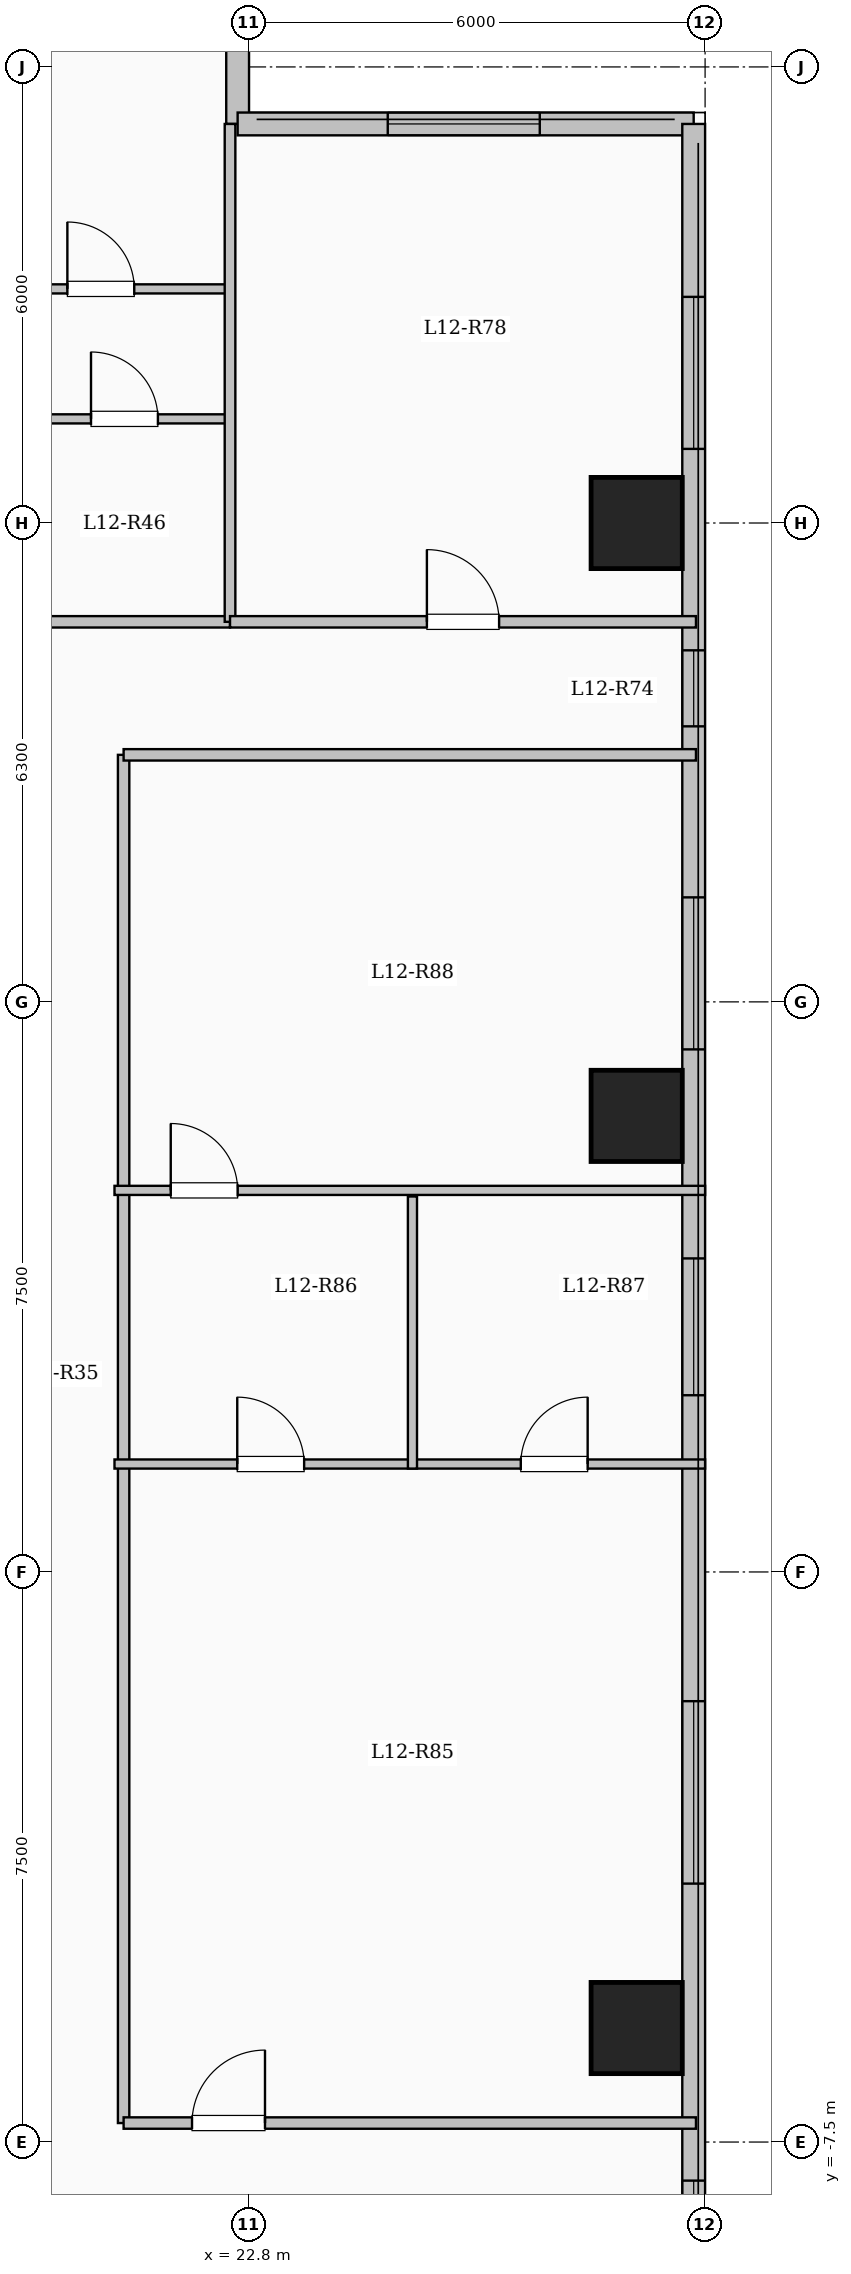
"""IFC4 building model, lengths in metres.
Left out: names, types, materials, properties, quantities, classifications, styles, units other than length and angle.
Written with IfcOpenShell. Run it as: python <this file> out.ifc"""

import sys

from ifc_helpers import new_model, si_unit, direction, frame, frame_2d, origin, origin_2d, place, context, subcontext, project, spatial, rectangle, extrude, element, fill, save


model = new_model("IFC4")
c1 = context("Model", 3, precision=1e-05, world=origin(), true_north=direction((0.0, 1.0)))
c2 = subcontext(c1, "Body", "Model", "MODEL_VIEW")
j1 = project(units=[si_unit("LENGTHUNIT", "METRE"), si_unit("PLANEANGLEUNIT", "RADIAN")], contexts=[c1])
p1 = place(None, origin())
s1 = spatial("IfcSite", under=j1, at=p1, CompositionType="ELEMENT")
p2 = place(p1, origin())
s2 = spatial("IfcBuilding", under=s1, at=p2, CompositionType="ELEMENT")
p3 = place(p2, frame((0.0, 0.0, 47.45)))
s3 = spatial("IfcBuildingStorey", under=s2, at=p3, CompositionType="ELEMENT", Elevation=47.45)
for number, where, z_axis, x_axis in (
    (1, (27.9, -6.0, 0.0), (0.0, 0.0, 1.0), (1.0, 0.0, 0.0)),
    (2, (27.9, 6.0, 0.0), (0.0, 0.0, 1.0), (1.0, 0.0, 0.0)),
    (3, (27.9, 13.8, 0.0), (0.0, 0.0, 1.0), (1.0, 0.0, 0.0)),
):
    element("IfcColumn", number, at=place(p3, frame(where, z_axis=z_axis, x_axis=x_axis)), inside=s3, PredefinedType="COLUMN", context=c2, shape_type="SweptSolid", body=[
        extrude(rectangle(XDim=1.2, YDim=1.2, at=origin_2d()), origin(), (0.0, 0.0, 1.0), 3.35),
    ])
p4 = place(p3, frame((22.65, 23.55, 0.0), z_axis=(0.0, 0.0, 1.0), x_axis=(0.0, -1.0, 0.0)))
e4 = element("IfcWall", 4, at=p4, inside=s3, PredefinedType="SOLIDWALL", context=c2, shape_type="SweptSolid", body=[
    extrude(rectangle(XDim=4.5, YDim=0.3, at=frame_2d((2.25, 0.0))), origin(), (0.0, 0.0, 1.0), 3.1),
])
p5 = place(p4, frame((1.367, 0.0, 0.9)))
e5 = element("IfcOpeningElement", 5, at=p5, cuts=e4, PredefinedType="OPENING", context=c2, shape_type="SweptSolid", body=[
    extrude(rectangle(XDim=1.8, YDim=1.65, at=frame_2d((0.9, 0.825))), frame((0.0, 0.16, 0.0), z_axis=(0.0, -1.0, 0.0), x_axis=(1.0, 0.0, 0.0)), (0.0, 0.0, 1.0), 0.32),
])
p6 = place(p3, frame((22.65, 19.05, 0.0), z_axis=(0.0, 0.0, 1.0), x_axis=(1.0, 0.0, 0.0)))
e6 = element("IfcWall", 6, at=p6, inside=s3, PredefinedType="SOLIDWALL", context=c2, shape_type="SweptSolid", body=[
    extrude(rectangle(XDim=6.0, YDim=0.3, at=frame_2d((3.0, 0.0))), origin(), (0.0, 0.0, 1.0), 3.1),
])
p7 = place(p6, frame((1.975, 0.0, 0.9)))
e7 = element("IfcOpeningElement", 7, at=p7, cuts=e6, PredefinedType="OPENING", context=c2, shape_type="SweptSolid", body=[
    extrude(rectangle(XDim=2.0, YDim=1.7, at=frame_2d((1.0, 0.85))), frame((0.0, 0.16, 0.0), z_axis=(0.0, -1.0, 0.0), x_axis=(1.0, 0.0, 0.0)), (0.0, 0.0, 1.0), 0.32),
])
p8 = place(p3, frame((28.65, 19.05, 0.0), z_axis=(0.0, 0.0, 1.0), x_axis=(0.0, -1.0, 0.0)))
e8 = element("IfcWall", 8, at=p8, inside=s3, PredefinedType="SOLIDWALL", context=c2, shape_type="SweptSolid", body=[
    extrude(rectangle(XDim=38.1, YDim=0.3, at=frame_2d((19.05, 0.0))), origin(), (0.0, 0.0, 1.0), 3.1),
])
p9 = place(p8, frame((2.275, 0.0, 0.9)))
e9 = element("IfcOpeningElement", 9, at=p9, cuts=e8, PredefinedType="OPENING", context=c2, shape_type="SweptSolid", body=[
    extrude(rectangle(XDim=2.0, YDim=1.7, at=frame_2d((1.0, 0.85))), frame((0.0, 0.16, 0.0), z_axis=(0.0, -1.0, 0.0), x_axis=(1.0, 0.0, 0.0)), (0.0, 0.0, 1.0), 0.32),
])
p10 = place(p8, frame((6.925, 0.0, 0.95)))
e10 = element("IfcOpeningElement", 10, at=p10, cuts=e8, PredefinedType="OPENING", context=c2, shape_type="SweptSolid", body=[
    extrude(rectangle(XDim=1.0, YDim=1.5, at=frame_2d((0.5, 0.75))), frame((0.0, 0.16, 0.0), z_axis=(0.0, -1.0, 0.0), x_axis=(1.0, 0.0, 0.0)), (0.0, 0.0, 1.0), 0.32),
])
p11 = place(p8, frame((10.175, 0.0, 0.9)))
e11 = element("IfcOpeningElement", 11, at=p11, cuts=e8, PredefinedType="OPENING", context=c2, shape_type="SweptSolid", body=[
    extrude(rectangle(XDim=2.0, YDim=1.7, at=frame_2d((1.0, 0.85))), frame((0.0, 0.16, 0.0), z_axis=(0.0, -1.0, 0.0), x_axis=(1.0, 0.0, 0.0)), (0.0, 0.0, 1.0), 0.32),
])
p12 = place(p8, frame((14.925, 0.0, 0.9)))
e12 = element("IfcOpeningElement", 12, at=p12, cuts=e8, PredefinedType="OPENING", context=c2, shape_type="SweptSolid", body=[
    extrude(rectangle(XDim=1.8, YDim=1.65, at=frame_2d((0.9, 0.825))), frame((0.0, 0.16, 0.0), z_axis=(0.0, -1.0, 0.0), x_axis=(1.0, 0.0, 0.0)), (0.0, 0.0, 1.0), 0.32),
])
p13 = place(p8, frame((20.75, 0.0, 0.9)))
e13 = element("IfcOpeningElement", 13, at=p13, cuts=e8, PredefinedType="OPENING", context=c2, shape_type="SweptSolid", body=[
    extrude(rectangle(XDim=2.4, YDim=1.8, at=frame_2d((1.2, 0.9))), frame((0.0, 0.16, 0.0), z_axis=(0.0, -1.0, 0.0), x_axis=(1.0, 0.0, 0.0)), (0.0, 0.0, 1.0), 0.32),
])
p14 = place(p8, frame((27.058, 0.0, 0.9)))
e14 = element("IfcOpeningElement", 14, at=p14, cuts=e8, PredefinedType="OPENING", context=c2, shape_type="SweptSolid", body=[
    extrude(rectangle(XDim=1.5, YDim=1.65, at=frame_2d((0.75, 0.825))), frame((0.0, 0.16, 0.0), z_axis=(0.0, -1.0, 0.0), x_axis=(1.0, 0.0, 0.0)), (0.0, 0.0, 1.0), 0.32),
])
p15 = place(p8, frame((32.55, 0.0, 0.9)))
e15 = element("IfcOpeningElement", 15, at=p15, cuts=e8, PredefinedType="OPENING", context=c2, shape_type="SweptSolid", body=[
    extrude(rectangle(XDim=2.4, YDim=1.8, at=frame_2d((1.2, 0.9))), frame((0.0, 0.16, 0.0), z_axis=(0.0, -1.0, 0.0), x_axis=(1.0, 0.0, 0.0)), (0.0, 0.0, 1.0), 0.32),
])
p16 = place(p3, frame((3.85, 12.5, 0.0), z_axis=(0.0, 0.0, 1.0), x_axis=(1.0, 0.0, 0.0)))
e16 = element("IfcWall", 16, at=p16, inside=s3, PredefinedType="PARTITIONING", context=c2, shape_type="SweptSolid", body=[
    extrude(rectangle(XDim=18.7, YDim=0.15, at=frame_2d((9.35, 0.0))), origin(), (0.0, 0.0, 1.0), 3.1),
])
p17 = place(p16, frame((1.6, 0.0, 0.0)))
e17 = element("IfcOpeningElement", 17, at=p17, cuts=e16, PredefinedType="OPENING", context=c2, shape_type="SweptSolid", body=[
    extrude(rectangle(XDim=0.96, YDim=2.15, at=frame_2d((0.48, 1.075))), frame((0.0, 0.085, 0.0), z_axis=(0.0, -1.0, 0.0), x_axis=(1.0, 0.0, 0.0)), (0.0, 0.0, 1.0), 0.17),
])
p18 = place(p16, frame((6.64, 0.0, 0.0)))
e18 = element("IfcOpeningElement", 18, at=p18, cuts=e16, PredefinedType="OPENING", context=c2, shape_type="SweptSolid", body=[
    extrude(rectangle(XDim=0.96, YDim=2.15, at=frame_2d((0.48, 1.075))), frame((0.0, 0.085, 0.0), z_axis=(0.0, -1.0, 0.0), x_axis=(1.0, 0.0, 0.0)), (0.0, 0.0, 1.0), 0.17),
])
p19 = place(p3, frame((21.15, -7.25, 0.0), z_axis=(0.0, 0.0, 1.0), x_axis=(0.0, 1.0, 0.0)))
e19 = element("IfcWall", 19, at=p19, inside=s3, PredefinedType="PARTITIONING", context=c2, shape_type="SweptSolid", body=[
    extrude(rectangle(XDim=18.0, YDim=0.15, at=frame_2d((9.0, 0.0))), origin(), (0.0, 0.0, 1.0), 2.585),
])
p20 = place(p3, frame((19.772, 15.17, 0.0), z_axis=(0.0, 0.0, 1.0), x_axis=(1.0, 0.0, 0.0)))
e20 = element("IfcWall", 20, at=p20, inside=s3, PredefinedType="PARTITIONING", context=c2, shape_type="SweptSolid", body=[
    extrude(rectangle(XDim=2.778, YDim=0.12, at=frame_2d((1.389, 0.0))), origin(), (0.0, 0.0, 1.0), 3.1),
])
p21 = place(p20, frame((0.949, 0.0, 0.0)))
e21 = element("IfcOpeningElement", 21, at=p21, cuts=e20, PredefinedType="OPENING", context=c2, shape_type="SweptSolid", body=[
    extrude(rectangle(XDim=0.88, YDim=2.1, at=frame_2d((0.44, 1.05))), frame((0.0, 0.07, 0.0), z_axis=(0.0, -1.0, 0.0), x_axis=(1.0, 0.0, 0.0)), (0.0, 0.0, 1.0), 0.14),
])
p22 = place(p3, frame((16.11, 16.88, 0.0), z_axis=(0.0, 0.0, 1.0), x_axis=(1.0, 0.0, 0.0)))
e22 = element("IfcWall", 22, at=p22, inside=s3, PredefinedType="PARTITIONING", context=c2, shape_type="SweptSolid", body=[
    extrude(rectangle(XDim=6.5, YDim=0.12, at=frame_2d((3.25, 0.0))), origin(), (0.0, 0.0, 1.0), 3.1),
])
p23 = place(p22, frame((1.14, 0.0, 0.0)))
e23 = element("IfcOpeningElement", 23, at=p23, cuts=e22, PredefinedType="OPENING", context=c2, shape_type="SweptSolid", body=[
    extrude(rectangle(XDim=0.88, YDim=2.1, at=frame_2d((0.44, 1.05))), frame((0.0, 0.07, 0.0), z_axis=(0.0, -1.0, 0.0), x_axis=(1.0, 0.0, 0.0)), (0.0, 0.0, 1.0), 0.14),
])
p24 = place(p22, frame((4.3, 0.0, 0.0)))
e24 = element("IfcOpeningElement", 24, at=p24, cuts=e22, PredefinedType="OPENING", context=c2, shape_type="SweptSolid", body=[
    extrude(rectangle(XDim=0.88, YDim=2.1, at=frame_2d((0.44, 1.05))), frame((0.0, 0.07, 0.0), z_axis=(0.0, -1.0, 0.0), x_axis=(1.0, 0.0, 0.0)), (0.0, 0.0, 1.0), 0.14),
])
p25 = place(p3, frame((21.15, -7.25, 0.0), z_axis=(0.0, 0.0, 1.0), x_axis=(1.0, 0.0, 0.0)))
e25 = element("IfcWall", 25, at=p25, inside=s3, PredefinedType="PARTITIONING", context=c2, shape_type="SweptSolid", body=[
    extrude(rectangle(XDim=7.53, YDim=0.15, at=frame_2d((3.765, 0.0))), origin(), (0.0, 0.0, 1.0), 3.1),
])
p26 = place(p25, frame((0.9, 0.0, 0.0)))
e26 = element("IfcOpeningElement", 26, at=p26, cuts=e25, PredefinedType="OPENING", context=c2, shape_type="SweptSolid", body=[
    extrude(rectangle(XDim=0.96, YDim=2.15, at=frame_2d((0.48, 1.075))), frame((0.0, 0.085, 0.0), z_axis=(0.0, -1.0, 0.0), x_axis=(1.0, 0.0, 0.0)), (0.0, 0.0, 1.0), 0.17),
])
p27 = place(p3, frame((21.15, 10.75, 0.0), z_axis=(0.0, 0.0, 1.0), x_axis=(1.0, 0.0, 0.0)))
e27 = element("IfcWall", 27, at=p27, inside=s3, PredefinedType="PARTITIONING", context=c2, shape_type="SweptSolid", body=[
    extrude(rectangle(XDim=7.53, YDim=0.15, at=frame_2d((3.765, 0.0))), origin(), (0.0, 0.0, 1.0), 3.1),
])
p28 = place(p3, frame((22.55, 12.5, 0.0), z_axis=(0.0, 0.0, 1.0), x_axis=(0.0, 1.0, 0.0)))
e28 = element("IfcWall", 28, at=p28, inside=s3, PredefinedType="PARTITIONING", context=c2, shape_type="SweptSolid", body=[
    extrude(rectangle(XDim=6.55, YDim=0.14, at=frame_2d((3.275, 0.0))), origin(), (0.0, 0.0, 1.0), 3.1),
])
p29 = place(p3, frame((22.55, 12.5, 0.0), z_axis=(0.0, 0.0, 1.0), x_axis=(1.0, 0.0, 0.0)))
e29 = element("IfcWall", 29, at=p29, inside=s3, PredefinedType="PARTITIONING", context=c2, shape_type="SweptSolid", body=[
    extrude(rectangle(XDim=6.13, YDim=0.15, at=frame_2d((3.065, 0.0))), origin(), (0.0, 0.0, 1.0), 3.1),
])
p30 = place(p29, frame((2.59, 0.0, 0.0)))
e30 = element("IfcOpeningElement", 30, at=p30, cuts=e29, PredefinedType="OPENING", context=c2, shape_type="SweptSolid", body=[
    extrude(rectangle(XDim=0.95, YDim=2.15, at=frame_2d((0.475, 1.075))), frame((0.0, 0.085, 0.0), z_axis=(0.0, -1.0, 0.0), x_axis=(1.0, 0.0, 0.0)), (0.0, 0.0, 1.0), 0.17),
])
p31 = place(p3, frame((21.03, 1.42, 0.0), z_axis=(0.0, 0.0, 1.0), x_axis=(1.0, 0.0, 0.0)))
e31 = element("IfcWall", 31, at=p31, inside=s3, PredefinedType="PARTITIONING", context=c2, shape_type="SweptSolid", body=[
    extrude(rectangle(XDim=7.77, YDim=0.12, at=frame_2d((3.885, 0.0))), origin(), (0.0, 0.0, 1.0), 3.1),
])
p32 = place(p31, frame((1.615, 0.0, 0.0)))
e32 = element("IfcOpeningElement", 32, at=p32, cuts=e31, PredefinedType="OPENING", context=c2, shape_type="SweptSolid", body=[
    extrude(rectangle(XDim=0.88, YDim=2.1, at=frame_2d((0.44, 1.05))), frame((0.0, 0.07, 0.0), z_axis=(0.0, -1.0, 0.0), x_axis=(1.0, 0.0, 0.0)), (0.0, 0.0, 1.0), 0.14),
])
p33 = place(p31, frame((5.345, 0.0, 0.0)))
e33 = element("IfcOpeningElement", 33, at=p33, cuts=e31, PredefinedType="OPENING", context=c2, shape_type="SweptSolid", body=[
    extrude(rectangle(XDim=0.88, YDim=2.1, at=frame_2d((0.44, 1.05))), frame((0.0, 0.07, 0.0), z_axis=(0.0, -1.0, 0.0), x_axis=(1.0, 0.0, 0.0)), (0.0, 0.0, 1.0), 0.14),
])
p34 = place(p3, frame((21.03, 5.02, 0.0), z_axis=(0.0, 0.0, 1.0), x_axis=(1.0, 0.0, 0.0)))
e34 = element("IfcWall", 34, at=p34, inside=s3, PredefinedType="PARTITIONING", context=c2, shape_type="SweptSolid", body=[
    extrude(rectangle(XDim=7.77, YDim=0.12, at=frame_2d((3.885, 0.0))), origin(), (0.0, 0.0, 1.0), 3.1),
])
p35 = place(p34, frame((0.74, 0.0, 0.0)))
e35 = element("IfcOpeningElement", 35, at=p35, cuts=e34, PredefinedType="OPENING", context=c2, shape_type="SweptSolid", body=[
    extrude(rectangle(XDim=0.88, YDim=2.1, at=frame_2d((0.44, 1.05))), frame((0.0, 0.07, 0.0), z_axis=(0.0, -1.0, 0.0), x_axis=(1.0, 0.0, 0.0)), (0.0, 0.0, 1.0), 0.14),
])
p36 = place(p3, frame((24.95, 1.36, 0.0), z_axis=(0.0, 0.0, 1.0), x_axis=(0.0, 1.0, 0.0)))
e36 = element("IfcWall", 36, at=p36, inside=s3, PredefinedType="PARTITIONING", context=c2, shape_type="SweptSolid", body=[
    extrude(rectangle(XDim=3.58, YDim=0.12, at=frame_2d((1.79, 0.0))), origin(), (0.0, 0.0, 1.0), 3.1),
])
p37 = place(p7, origin())
e37 = element("IfcWindow", 37, at=p37, inside=s3, PartitioningType="SINGLE_PANEL", PredefinedType="WINDOW", context=c2, shape_type="SweptSolid", body=[
    extrude(rectangle(XDim=2.0, YDim=1.7, at=frame_2d((1.0, 0.85))), frame((0.0, 0.03, 0.0), z_axis=(0.0, -1.0, 0.0), x_axis=(1.0, 0.0, 0.0)), (0.0, 0.0, 1.0), 0.06),
])
fill(e7, e37)
p38 = place(p9, origin())
e38 = element("IfcWindow", 38, at=p38, inside=s3, PartitioningType="SINGLE_PANEL", PredefinedType="WINDOW", context=c2, shape_type="SweptSolid", body=[
    extrude(rectangle(XDim=2.0, YDim=1.7, at=frame_2d((1.0, 0.85))), frame((0.0, 0.03, 0.0), z_axis=(0.0, -1.0, 0.0), x_axis=(1.0, 0.0, 0.0)), (0.0, 0.0, 1.0), 0.06),
])
fill(e9, e38)
p39 = place(p10, origin())
e39 = element("IfcWindow", 39, at=p39, inside=s3, PartitioningType="SINGLE_PANEL", PredefinedType="WINDOW", context=c2, shape_type="SweptSolid", body=[
    extrude(rectangle(XDim=1.0, YDim=1.5, at=frame_2d((0.5, 0.75))), frame((0.0, 0.03, 0.0), z_axis=(0.0, -1.0, 0.0), x_axis=(1.0, 0.0, 0.0)), (0.0, 0.0, 1.0), 0.06),
])
fill(e10, e39)
p40 = place(p11, origin())
e40 = element("IfcWindow", 40, at=p40, inside=s3, PartitioningType="SINGLE_PANEL", PredefinedType="WINDOW", context=c2, shape_type="SweptSolid", body=[
    extrude(rectangle(XDim=2.0, YDim=1.7, at=frame_2d((1.0, 0.85))), frame((0.0, 0.03, 0.0), z_axis=(0.0, -1.0, 0.0), x_axis=(1.0, 0.0, 0.0)), (0.0, 0.0, 1.0), 0.06),
])
fill(e11, e40)
p41 = place(p12, origin())
e41 = element("IfcWindow", 41, at=p41, inside=s3, PartitioningType="SINGLE_PANEL", PredefinedType="WINDOW", context=c2, shape_type="SweptSolid", body=[
    extrude(rectangle(XDim=1.8, YDim=1.65, at=frame_2d((0.9, 0.825))), frame((0.0, 0.03, 0.0), z_axis=(0.0, -1.0, 0.0), x_axis=(1.0, 0.0, 0.0)), (0.0, 0.0, 1.0), 0.06),
])
fill(e12, e41)
p42 = place(p13, origin())
e42 = element("IfcWindow", 42, at=p42, inside=s3, PartitioningType="SINGLE_PANEL", PredefinedType="WINDOW", context=c2, shape_type="SweptSolid", body=[
    extrude(rectangle(XDim=2.4, YDim=1.8, at=frame_2d((1.2, 0.9))), frame((0.0, 0.03, 0.0), z_axis=(0.0, -1.0, 0.0), x_axis=(1.0, 0.0, 0.0)), (0.0, 0.0, 1.0), 0.06),
])
fill(e13, e42)
p43 = place(p14, origin())
e43 = element("IfcWindow", 43, at=p43, inside=s3, PartitioningType="SINGLE_PANEL", PredefinedType="WINDOW", context=c2, shape_type="SweptSolid", body=[
    extrude(rectangle(XDim=1.5, YDim=1.65, at=frame_2d((0.75, 0.825))), frame((0.0, 0.03, 0.0), z_axis=(0.0, -1.0, 0.0), x_axis=(1.0, 0.0, 0.0)), (0.0, 0.0, 1.0), 0.06),
])
fill(e14, e43)
p44 = place(p21, origin())
e44 = element("IfcDoor", 44, at=p44, inside=s3, OperationType="SINGLE_SWING_LEFT", PredefinedType="DOOR", context=c2, shape_type="SweptSolid", body=[
    extrude(rectangle(XDim=0.88, YDim=2.1, at=frame_2d((0.44, 1.05))), frame((0.0, 0.025, 0.0), z_axis=(0.0, -1.0, 0.0), x_axis=(1.0, 0.0, 0.0)), (0.0, 0.0, 1.0), 0.05),
])
fill(e21, e44)
p45 = place(p24, origin())
e45 = element("IfcDoor", 45, at=p45, inside=s3, OperationType="SINGLE_SWING_LEFT", PredefinedType="DOOR", context=c2, shape_type="SweptSolid", body=[
    extrude(rectangle(XDim=0.88, YDim=2.1, at=frame_2d((0.44, 1.05))), frame((0.0, 0.025, 0.0), z_axis=(0.0, -1.0, 0.0), x_axis=(1.0, 0.0, 0.0)), (0.0, 0.0, 1.0), 0.05),
])
fill(e24, e45)
p46 = place(p30, origin())
e46 = element("IfcDoor", 46, at=p46, inside=s3, OperationType="SINGLE_SWING_LEFT", PredefinedType="DOOR", context=c2, shape_type="SweptSolid", body=[
    extrude(rectangle(XDim=0.95, YDim=2.15, at=frame_2d((0.475, 1.075))), frame((0.0, 0.025, 0.0), z_axis=(0.0, -1.0, 0.0), x_axis=(1.0, 0.0, 0.0)), (0.0, 0.0, 1.0), 0.05),
])
fill(e30, e46)
p47 = place(p26, origin())
e47 = element("IfcDoor", 47, at=p47, inside=s3, OperationType="SINGLE_SWING_RIGHT", PredefinedType="DOOR", context=c2, shape_type="SweptSolid", body=[
    extrude(rectangle(XDim=0.96, YDim=2.15, at=frame_2d((0.48, 1.075))), frame((0.0, 0.025, 0.0), z_axis=(0.0, -1.0, 0.0), x_axis=(1.0, 0.0, 0.0)), (0.0, 0.0, 1.0), 0.05),
])
fill(e26, e47)
p48 = place(p32, origin())
e48 = element("IfcDoor", 48, at=p48, inside=s3, OperationType="SINGLE_SWING_LEFT", PredefinedType="DOOR", context=c2, shape_type="SweptSolid", body=[
    extrude(rectangle(XDim=0.88, YDim=2.1, at=frame_2d((0.44, 1.05))), frame((0.0, 0.025, 0.0), z_axis=(0.0, -1.0, 0.0), x_axis=(1.0, 0.0, 0.0)), (0.0, 0.0, 1.0), 0.05),
])
fill(e32, e48)
p49 = place(p33, origin())
e49 = element("IfcDoor", 49, at=p49, inside=s3, OperationType="SINGLE_SWING_RIGHT", PredefinedType="DOOR", context=c2, shape_type="SweptSolid", body=[
    extrude(rectangle(XDim=0.88, YDim=2.1, at=frame_2d((0.44, 1.05))), frame((0.0, 0.025, 0.0), z_axis=(0.0, -1.0, 0.0), x_axis=(1.0, 0.0, 0.0)), (0.0, 0.0, 1.0), 0.05),
])
fill(e33, e49)
p50 = place(p35, origin())
e50 = element("IfcDoor", 50, at=p50, inside=s3, OperationType="SINGLE_SWING_LEFT", PredefinedType="DOOR", context=c2, shape_type="SweptSolid", body=[
    extrude(rectangle(XDim=0.88, YDim=2.1, at=frame_2d((0.44, 1.05))), frame((0.0, 0.025, 0.0), z_axis=(0.0, -1.0, 0.0), x_axis=(1.0, 0.0, 0.0)), (0.0, 0.0, 1.0), 0.05),
])
fill(e35, e50)
save(model, sys.argv[1])
